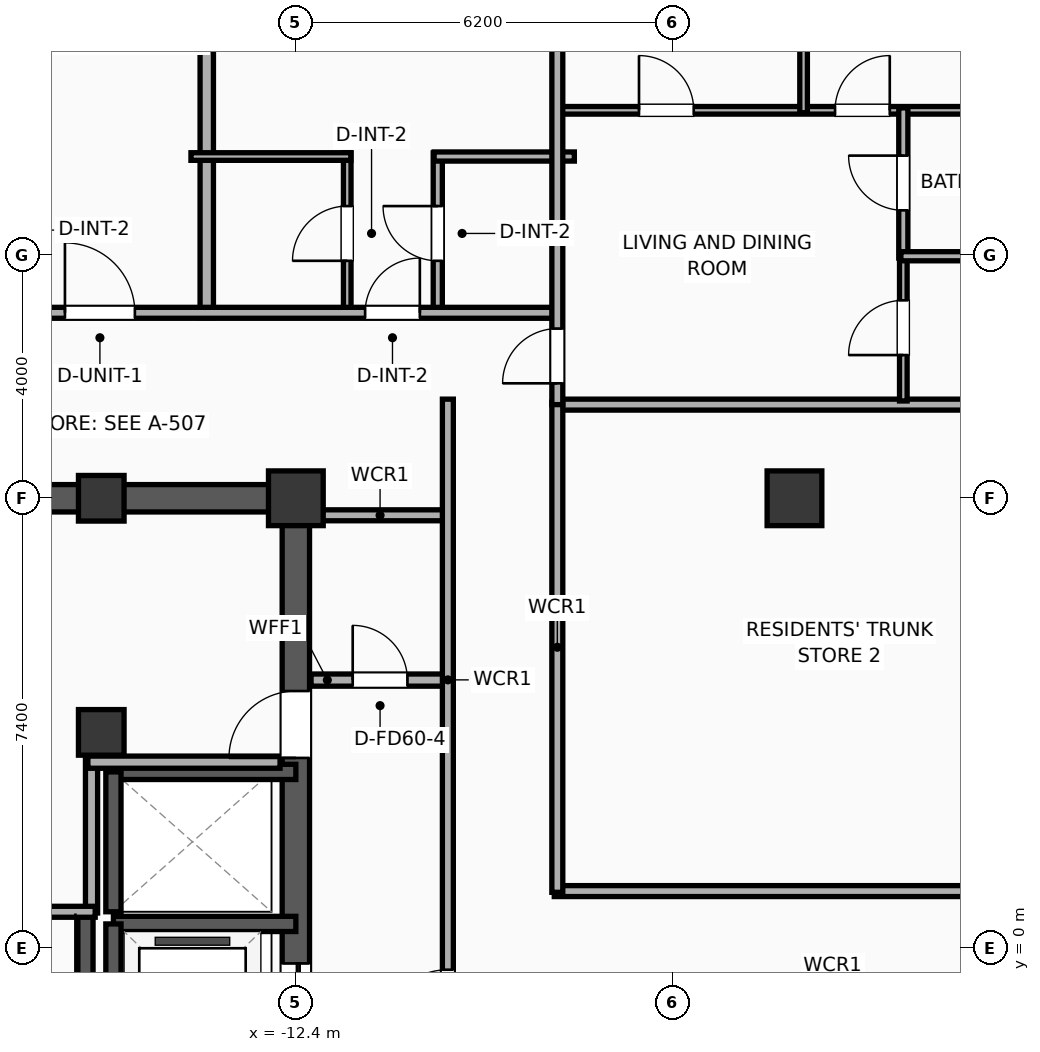
"""IFC4 building model, lengths in metres.
Left out: names, types, materials, properties, quantities, classifications, styles, units other than length and angle.
Written with IfcOpenShell. Run it as: python <this file> out.ifc"""

import sys

from ifc_helpers import new_model, si_unit, direction, frame, frame_2d, origin, origin_2d, place, context, subcontext, project, spatial, rectangle, extrude, element, fill, save


model = new_model("IFC4")
c1 = context("Model", 3, precision=1e-05, world=origin(), true_north=direction((0.0, 1.0)))
c2 = subcontext(c1, "Body", "Model", "MODEL_VIEW")
j1 = project(units=[si_unit("LENGTHUNIT", "METRE"), si_unit("PLANEANGLEUNIT", "RADIAN")], contexts=[c1])
p1 = place(None, origin())
s1 = spatial("IfcSite", under=j1, at=p1, CompositionType="ELEMENT")
p2 = place(p1, origin())
s2 = spatial("IfcBuilding", under=s1, at=p2, CompositionType="ELEMENT")
p3 = place(p2, frame((0.0, 0.0, 156.0)))
s3 = spatial("IfcBuildingStorey", under=s2, at=p3, CompositionType="ELEMENT", Elevation=156.0)
for number, where, z_axis, x_axis in (
    (1, (-15.6, 7.4, 0.0), (0.0, 0.0, 1.0), (1.0, 0.0, 0.0)),
    (2, (-15.6, 3.55, 0.0), (0.0, 0.0, 1.0), (1.0, 0.0, 0.0)),
):
    element("IfcColumn", number, at=place(p3, frame(where, z_axis=z_axis, x_axis=x_axis)), inside=s3, PredefinedType="COLUMN", context=c2, shape_type="SweptSolid", body=[
        extrude(rectangle(XDim=0.75, YDim=0.75, at=origin_2d()), origin(), (0.0, 0.0, 1.0), 3.9),
    ])
p4 = place(p3, frame((-12.4, 7.4, 0.0), z_axis=(0.0, 0.0, 1.0), x_axis=(1.0, 0.0, 0.0)))
e3 = element("IfcColumn", 3, at=p4, inside=s3, PredefinedType="COLUMN", context=c2, shape_type="SweptSolid", body=[
    extrude(rectangle(XDim=0.9, YDim=0.9, at=origin_2d()), origin(), (0.0, 0.0, 1.0), 3.9),
])
p5 = place(p3, frame((-19.425, 7.4, 0.0), z_axis=(0.0, 0.0, 1.0), x_axis=(1.0, 0.0, 0.0)))
e4 = element("IfcWall", 4, at=p5, inside=s3, PredefinedType="SHEAR", context=c2, shape_type="SweptSolid", body=[
    extrude(rectangle(XDim=7.25, YDim=0.45, at=frame_2d((3.625, 0.0))), origin(), (0.0, 0.0, 1.0), 3.65),
])
p6 = place(p3, frame((-12.4, -7.4, 0.0), z_axis=(0.0, 0.0, 1.0), x_axis=(0.0, 1.0, 0.0)))
e5 = element("IfcWall", 5, at=p6, inside=s3, PredefinedType="SHEAR", context=c2, shape_type="SweptSolid", body=[
    extrude(rectangle(XDim=14.8, YDim=0.45, at=frame_2d((7.4, 0.0))), origin(), (0.0, 0.0, 1.0), 3.65),
])
p7 = place(p6, frame((6.05, 0.0, 0.0)))
e6 = element("IfcOpeningElement", 6, at=p7, cuts=e5, PredefinedType="OPENING", context=c2, shape_type="SweptSolid", body=[
    extrude(rectangle(XDim=1.1, YDim=2.05, at=frame_2d((0.55, 1.025))), frame((0.0, 0.235, 0.0), z_axis=(0.0, -1.0, 0.0), x_axis=(1.0, 0.0, 0.0)), (0.0, 0.0, 1.0), 0.47),
])
p8 = place(p6, frame((10.53, 0.0, 0.0)))
e7 = element("IfcOpeningElement", 7, at=p8, cuts=e5, PredefinedType="OPENING", context=c2, shape_type="SweptSolid", body=[
    extrude(rectangle(XDim=1.1, YDim=2.05, at=frame_2d((0.55, 1.025))), frame((0.0, 0.235, 0.0), z_axis=(0.0, -1.0, 0.0), x_axis=(1.0, 0.0, 0.0)), (0.0, 0.0, 1.0), 0.47),
])
p9 = place(p6, frame((2.25, 0.0, 0.0)))
e8 = element("IfcOpeningElement", 8, at=p9, cuts=e5, PredefinedType="OPENING", context=c2, shape_type="SweptSolid", body=[
    extrude(rectangle(XDim=0.9, YDim=2.05, at=frame_2d((0.45, 1.025))), frame((0.0, 0.235, 0.0), z_axis=(0.0, -1.0, 0.0), x_axis=(1.0, 0.0, 0.0)), (0.0, 0.0, 1.0), 0.47),
])
p10 = place(p3, frame((-15.86, -7.085, 0.0), z_axis=(0.0, 0.0, 1.0), x_axis=(0.0, 1.0, 0.0)))
e9 = element("IfcWall", 9, at=p10, inside=s3, PredefinedType="SOLIDWALL", context=c2, shape_type="SweptSolid", body=[
    extrude(rectangle(XDim=7.685, YDim=0.25, at=frame_2d((3.843, 0.0))), origin(), (0.0, 0.0, 1.0), 3.65),
])
p11 = place(p3, frame((-4.2, 7.4, 0.0), z_axis=(0.0, 0.0, 1.0), x_axis=(1.0, 0.0, 0.0)))
e10 = element("IfcColumn", 10, at=p11, inside=s3, PredefinedType="COLUMN", context=c2, shape_type="SweptSolid", body=[
    extrude(rectangle(XDim=0.9, YDim=0.9, at=origin_2d()), origin(), (0.0, 0.0, 1.0), 3.9),
])
p12 = place(p3, frame((-12.4, 0.4, 0.0), z_axis=(0.0, 0.0, 1.0), x_axis=(-1.0, 0.0, 0.0)))
e11 = element("IfcWall", 11, at=p12, inside=s3, PredefinedType="SOLIDWALL", context=c2, shape_type="SweptSolid", body=[
    extrude(rectangle(XDim=3.0, YDim=0.25, at=frame_2d((1.5, 0.0))), origin(), (0.0, 0.0, 1.0), 3.65),
])
p13 = place(p3, frame((-15.4, 0.4, 0.0), z_axis=(0.0, 0.0, 1.0), x_axis=(0.0, -1.0, 0.0)))
e12 = element("IfcWall", 12, at=p13, inside=s3, PredefinedType="SOLIDWALL", context=c2, shape_type="SweptSolid", body=[
    extrude(rectangle(XDim=2.4, YDim=0.25, at=frame_2d((1.2, 0.0))), origin(), (0.0, 0.0, 1.0), 3.65),
])
p14 = place(p3, frame((-12.4, 2.9, 0.0), z_axis=(0.0, 0.0, 1.0), x_axis=(-1.0, 0.0, 0.0)))
e13 = element("IfcWall", 13, at=p14, inside=s3, PredefinedType="SOLIDWALL", context=c2, shape_type="SweptSolid", body=[
    extrude(rectangle(XDim=3.0, YDim=0.25, at=frame_2d((1.5, 0.0))), origin(), (0.0, 0.0, 1.0), 3.65),
])
p15 = place(p3, frame((-15.4, 2.9, 0.0), z_axis=(0.0, 0.0, 1.0), x_axis=(0.0, -1.0, 0.0)))
e14 = element("IfcWall", 14, at=p15, inside=s3, PredefinedType="SOLIDWALL", context=c2, shape_type="SweptSolid", body=[
    extrude(rectangle(XDim=2.3, YDim=0.25, at=frame_2d((1.15, 0.0))), origin(), (0.0, 0.0, 1.0), 3.65),
])
p16 = place(p3, frame((-15.76, 0.58, 0.0), z_axis=(0.0, 0.0, 1.0), x_axis=(0.0, 1.0, 0.0)))
e15 = element("IfcWall", 15, at=p16, inside=s3, PredefinedType="PARTITIONING", context=c2, shape_type="SweptSolid", body=[
    extrude(rectangle(XDim=2.52, YDim=0.2, at=frame_2d((1.26, 0.0))), origin(), (0.0, 0.0, 1.0), 3.65),
])
p17 = place(p3, frame((-15.82, 3.06, 0.0), z_axis=(0.0, 0.0, 1.0), x_axis=(1.0, 0.0, 0.0)))
e16 = element("IfcWall", 16, at=p17, inside=s3, PredefinedType="PARTITIONING", context=c2, shape_type="SweptSolid", body=[
    extrude(rectangle(XDim=3.16, YDim=0.2, at=frame_2d((1.58, 0.0))), origin(), (0.0, 0.0, 1.0), 3.65),
])
p18 = place(p3, frame((-19.06, 0.6, 0.0), z_axis=(0.0, 0.0, 1.0), x_axis=(1.0, 0.0, 0.0)))
e17 = element("IfcWall", 17, at=p18, inside=s3, PredefinedType="PARTITIONING", context=c2, shape_type="SweptSolid", body=[
    extrude(rectangle(XDim=3.36, YDim=0.18, at=frame_2d((1.68, 0.0))), origin(), (0.0, 0.0, 1.0), 3.65),
])
p19 = place(p18, frame((1.155, 0.0, 0.0)))
e18 = element("IfcOpeningElement", 18, at=p19, cuts=e17, PredefinedType="OPENING", context=c2, shape_type="SweptSolid", body=[
    extrude(rectangle(XDim=1.05, YDim=2.05, at=frame_2d((0.525, 1.025))), frame((0.0, 0.1, 0.0), z_axis=(0.0, -1.0, 0.0), x_axis=(1.0, 0.0, 0.0)), (0.0, 0.0, 1.0), 0.2),
])
p20 = place(p3, frame((-12.15, 4.41, 0.0), z_axis=(0.0, 0.0, 1.0), x_axis=(1.0, 0.0, 0.0)))
e19 = element("IfcWall", 19, at=p20, inside=s3, PredefinedType="PARTITIONING", context=c2, shape_type="SweptSolid", body=[
    extrude(rectangle(XDim=2.27, YDim=0.2, at=frame_2d((1.135, 0.0))), origin(), (0.0, 0.0, 1.0), 3.65),
])
p21 = place(p20, frame((0.685, 0.0, 0.0)))
e20 = element("IfcOpeningElement", 20, at=p21, cuts=e19, PredefinedType="OPENING", context=c2, shape_type="SweptSolid", body=[
    extrude(rectangle(XDim=0.9, YDim=2.05, at=frame_2d((0.45, 1.025))), frame((0.0, 0.11, 0.0), z_axis=(0.0, -1.0, 0.0), x_axis=(1.0, 0.0, 0.0)), (0.0, 0.0, 1.0), 0.22),
])
p22 = place(p3, frame((-12.15, 7.12, 0.0), z_axis=(0.0, 0.0, 1.0), x_axis=(1.0, 0.0, 0.0)))
e21 = element("IfcWall", 21, at=p22, inside=s3, PredefinedType="PARTITIONING", context=c2, shape_type="SweptSolid", body=[
    extrude(rectangle(XDim=2.27, YDim=0.18, at=frame_2d((1.135, 0.0))), origin(), (0.0, 0.0, 1.0), 3.65),
])
p23 = place(p3, frame((-9.9, -9.03, 0.0), z_axis=(0.0, 0.0, 1.0), x_axis=(0.0, 1.0, 0.0)))
e22 = element("IfcWall", 22, at=p23, inside=s3, PredefinedType="PARTITIONING", context=c2, shape_type="SweptSolid", body=[
    extrude(rectangle(XDim=18.06, YDim=0.18, at=frame_2d((9.03, 0.0))), origin(), (0.0, 0.0, 1.0), 3.65),
])
p24 = place(p23, frame((7.577, 0.0, 0.0)))
e23 = element("IfcOpeningElement", 23, at=p24, cuts=e22, PredefinedType="OPENING", context=c2, shape_type="SweptSolid", body=[
    extrude(rectangle(XDim=1.1, YDim=2.05, at=frame_2d((0.55, 1.025))), frame((0.0, 0.1, 0.0), z_axis=(0.0, -1.0, 0.0), x_axis=(1.0, 0.0, 0.0)), (0.0, 0.0, 1.0), 0.2),
])
p25 = place(p3, frame((-8.15, 8.94, 0.0), z_axis=(0.0, 0.0, 1.0), x_axis=(1.0, 0.0, 0.0)))
e24 = element("IfcWall", 24, at=p25, inside=s3, PredefinedType="PARTITIONING", context=c2, shape_type="SweptSolid", body=[
    extrude(rectangle(XDim=16.3, YDim=0.18, at=frame_2d((8.15, 0.0))), origin(), (0.0, 0.0, 1.0), 3.65),
])
p26 = place(p3, frame((-8.15, 0.94, 0.0), z_axis=(0.0, 0.0, 1.0), x_axis=(1.0, 0.0, 0.0)))
e25 = element("IfcWall", 25, at=p26, inside=s3, PredefinedType="PARTITIONING", context=c2, shape_type="SweptSolid", body=[
    extrude(rectangle(XDim=16.3, YDim=0.18, at=frame_2d((8.15, 0.0))), origin(), (0.0, 0.0, 1.0), 3.65),
])
p27 = place(p26, frame((7.675, 0.0, 0.0)))
e26 = element("IfcOpeningElement", 26, at=p27, cuts=e25, PredefinedType="OPENING", context=c2, shape_type="SweptSolid", body=[
    extrude(rectangle(XDim=0.95, YDim=2.05, at=frame_2d((0.475, 1.025))), frame((0.0, 0.1, 0.0), z_axis=(0.0, -1.0, 0.0), x_axis=(1.0, 0.0, 0.0)), (0.0, 0.0, 1.0), 0.2),
])
p28 = place(p3, frame((-8.1, 0.92, 0.0), z_axis=(0.0, 0.0, 1.0), x_axis=(0.0, 1.0, 0.0)))
e27 = element("IfcWall", 27, at=p28, inside=s3, PredefinedType="PARTITIONING", context=c2, shape_type="SweptSolid", body=[
    extrude(rectangle(XDim=8.06, YDim=0.18, at=frame_2d((4.03, 0.0))), origin(), (0.0, 0.0, 1.0), 3.65),
])
p29 = place(p3, frame((-13.865, 10.37, 0.0), z_axis=(0.0, 0.0, 1.0), x_axis=(0.0, 1.0, 0.0)))
e28 = element("IfcWall", 28, at=p29, inside=s3, PredefinedType="PARTITIONING", context=c2, shape_type="SweptSolid", body=[
    extrude(rectangle(XDim=8.25, YDim=0.22, at=frame_2d((4.125, 0.0))), origin(), (0.0, 0.0, 1.0), 3.65),
])
p30 = place(p3, frame((-11.555, 10.43, 0.0), z_axis=(0.0, 0.0, 1.0), x_axis=(0.0, 1.0, 0.0)))
e29 = element("IfcWall", 29, at=p30, inside=s3, PredefinedType="PARTITIONING", context=c2, shape_type="SweptSolid", body=[
    extrude(rectangle(XDim=2.65, YDim=0.125, at=frame_2d((1.325, 0.0))), origin(), (0.0, 0.0, 1.0), 3.04),
])
p31 = place(p30, frame((0.875, 0.0, 0.0)))
e30 = element("IfcOpeningElement", 30, at=p31, cuts=e29, PredefinedType="OPENING", context=c2, shape_type="SweptSolid", body=[
    extrude(rectangle(XDim=0.9, YDim=2.05, at=frame_2d((0.45, 1.025))), frame((0.0, 0.073, 0.0), z_axis=(0.0, -1.0, 0.0), x_axis=(1.0, 0.0, 0.0)), (0.0, 0.0, 1.0), 0.145),
])
p32 = place(p3, frame((-10.066, 10.43, 0.0), z_axis=(0.0, 0.0, 1.0), x_axis=(0.0, 1.0, 0.0)))
e31 = element("IfcWall", 31, at=p32, inside=s3, PredefinedType="PLUMBINGWALL", context=c2, shape_type="SweptSolid", body=[
    extrude(rectangle(XDim=2.65, YDim=0.15, at=frame_2d((1.325, 0.0))), origin(), (0.0, 0.0, 1.0), 3.65),
])
p33 = place(p32, frame((0.875, 0.0, 0.0)))
e32 = element("IfcOpeningElement", 32, at=p33, cuts=e31, PredefinedType="OPENING", context=c2, shape_type="SweptSolid", body=[
    extrude(rectangle(XDim=0.9, YDim=2.05, at=frame_2d((0.45, 1.025))), frame((0.0, 0.085, 0.0), z_axis=(0.0, -1.0, 0.0), x_axis=(1.0, 0.0, 0.0)), (0.0, 0.0, 1.0), 0.17),
])
p34 = place(p3, frame((-14.125, 13.02, 0.0), z_axis=(0.0, 0.0, 1.0), x_axis=(1.0, 0.0, 0.0)))
e33 = element("IfcWall", 33, at=p34, inside=s3, PredefinedType="PARTITIONING", context=c2, shape_type="SweptSolid", body=[
    extrude(rectangle(XDim=2.63, YDim=0.125, at=frame_2d((1.315, 0.0))), origin(), (0.0, 0.0, 1.0), 3.65),
])
p35 = place(p3, frame((-10.126, 13.02, 0.0), z_axis=(0.0, 0.0, 1.0), x_axis=(1.0, 0.0, 0.0)))
e34 = element("IfcWall", 34, at=p35, inside=s3, PredefinedType="PLUMBINGWALL", context=c2, shape_type="SweptSolid", body=[
    extrude(rectangle(XDim=2.306, YDim=0.15, at=frame_2d((1.153, 0.0))), origin(), (0.0, 0.0, 1.0), 3.65),
])
p36 = place(p3, frame((-19.75, 10.45, 0.0), z_axis=(0.0, 0.0, 1.0), x_axis=(1.0, 0.0, 0.0)))
e35 = element("IfcWall", 35, at=p36, inside=s3, PredefinedType="PARTITIONING", context=c2, shape_type="SweptSolid", body=[
    extrude(rectangle(XDim=11.67, YDim=0.18, at=frame_2d((5.835, 0.0))), origin(), (0.0, 0.0, 1.0), 3.65),
])
p37 = place(p36, frame((3.553, 0.0, 0.0)))
e36 = element("IfcOpeningElement", 36, at=p37, cuts=e35, PredefinedType="OPENING", context=c2, shape_type="SweptSolid", body=[
    extrude(rectangle(XDim=1.15, YDim=2.05, at=frame_2d((0.575, 1.025))), frame((0.0, 0.1, 0.0), z_axis=(0.0, -1.0, 0.0), x_axis=(1.0, 0.0, 0.0)), (0.0, 0.0, 1.0), 0.2),
])
p38 = place(p36, frame((8.489, 0.0, 0.0)))
e37 = element("IfcOpeningElement", 37, at=p38, cuts=e35, PredefinedType="OPENING", context=c2, shape_type="SweptSolid", body=[
    extrude(rectangle(XDim=0.9, YDim=2.05, at=frame_2d((0.45, 1.025))), frame((0.0, 0.1, 0.0), z_axis=(0.0, -1.0, 0.0), x_axis=(1.0, 0.0, 0.0)), (0.0, 0.0, 1.0), 0.2),
])
p39 = place(p3, frame((-8.08, 13.78, 0.0), z_axis=(0.0, 0.0, 1.0), x_axis=(1.0, 0.0, 0.0)))
e38 = element("IfcWall", 38, at=p39, inside=s3, PredefinedType="PARTITIONING", context=c2, shape_type="SweptSolid", body=[
    extrude(rectangle(XDim=8.06, YDim=0.125, at=frame_2d((4.03, 0.0))), origin(), (0.0, 0.0, 1.0), 3.65),
])
p40 = place(p39, frame((1.323, 0.0, 0.0)))
e39 = element("IfcOpeningElement", 39, at=p40, cuts=e38, PredefinedType="OPENING", context=c2, shape_type="SweptSolid", body=[
    extrude(rectangle(XDim=0.9, YDim=2.05, at=frame_2d((0.45, 1.025))), frame((0.0, 0.073, 0.0), z_axis=(0.0, -1.0, 0.0), x_axis=(1.0, 0.0, 0.0)), (0.0, 0.0, 1.0), 0.145),
])
p41 = place(p39, frame((4.547, 0.0, 0.0)))
e40 = element("IfcOpeningElement", 40, at=p41, cuts=e38, PredefinedType="OPENING", context=c2, shape_type="SweptSolid", body=[
    extrude(rectangle(XDim=0.9, YDim=2.05, at=frame_2d((0.45, 1.025))), frame((0.0, 0.073, 0.0), z_axis=(0.0, -1.0, 0.0), x_axis=(1.0, 0.0, 0.0)), (0.0, 0.0, 1.0), 0.145),
])
p42 = place(p3, frame((-2.41, 9.0, 0.0), z_axis=(0.0, 0.0, 1.0), x_axis=(0.0, 1.0, 0.0)))
e41 = element("IfcWall", 41, at=p42, inside=s3, PredefinedType="PARTITIONING", context=c2, shape_type="SweptSolid", body=[
    extrude(rectangle(XDim=2.41, YDim=0.125, at=frame_2d((1.205, 0.0))), origin(), (0.0, 0.0, 1.0), 3.65),
])
p43 = place(p42, frame((0.755, 0.0, 0.0)))
e42 = element("IfcOpeningElement", 42, at=p43, cuts=e41, PredefinedType="OPENING", context=c2, shape_type="SweptSolid", body=[
    extrude(rectangle(XDim=0.9, YDim=2.05, at=frame_2d((0.45, 1.025))), frame((0.0, 0.073, 0.0), z_axis=(0.0, -1.0, 0.0), x_axis=(1.0, 0.0, 0.0)), (0.0, 0.0, 1.0), 0.145),
])
p44 = place(p3, frame((-2.41, 11.35, 0.0), z_axis=(0.0, 0.0, 1.0), x_axis=(0.0, 1.0, 0.0)))
e43 = element("IfcWall", 43, at=p44, inside=s3, PredefinedType="PLUMBINGWALL", context=c2, shape_type="SweptSolid", body=[
    extrude(rectangle(XDim=2.47, YDim=0.15, at=frame_2d((1.235, 0.0))), origin(), (0.0, 0.0, 1.0), 3.04),
])
p45 = place(p44, frame((0.785, 0.0, 0.0)))
e44 = element("IfcOpeningElement", 44, at=p45, cuts=e43, PredefinedType="OPENING", context=c2, shape_type="SweptSolid", body=[
    extrude(rectangle(XDim=0.9, YDim=2.05, at=frame_2d((0.45, 1.025))), frame((0.0, 0.085, 0.0), z_axis=(0.0, -1.0, 0.0), x_axis=(1.0, 0.0, 0.0)), (0.0, 0.0, 1.0), 0.17),
])
p46 = place(p3, frame((-2.45, 11.38, 0.0), z_axis=(0.0, 0.0, 1.0), x_axis=(1.0, 0.0, 0.0)))
e45 = element("IfcWall", 45, at=p46, inside=s3, PredefinedType="PLUMBINGWALL", context=c2, shape_type="SweptSolid", body=[
    extrude(rectangle(XDim=2.43, YDim=0.15, at=frame_2d((1.215, 0.0))), origin(), (0.0, 0.0, 1.0), 3.65),
])
p47 = place(p3, frame((-4.05, 13.74, 0.0), z_axis=(0.0, 0.0, 1.0), x_axis=(0.0, 1.0, 0.0)))
e46 = element("IfcWall", 46, at=p47, inside=s3, PredefinedType="PARTITIONING", context=c2, shape_type="SweptSolid", body=[
    extrude(rectangle(XDim=5.912, YDim=0.125, at=frame_2d((2.956, 0.0))), origin(), (0.0, 0.0, 1.0), 3.65),
])
p48 = place(p3, frame((-8.1, 8.94, 0.0), z_axis=(0.0, 0.0, 1.0), x_axis=(0.0, 1.0, 0.0)))
e47 = element("IfcWall", 47, at=p48, inside=s3, PredefinedType="PARTITIONING", context=c2, shape_type="SweptSolid", body=[
    extrude(rectangle(XDim=10.286, YDim=0.18, at=frame_2d((5.143, 0.0))), origin(), (0.0, 0.0, 1.0), 3.65),
])
p49 = place(p48, frame((0.35, 0.0, 0.0)))
e48 = element("IfcOpeningElement", 48, at=p49, cuts=e47, PredefinedType="OPENING", context=c2, shape_type="SweptSolid", body=[
    extrude(rectangle(XDim=0.9, YDim=2.05, at=frame_2d((0.45, 1.025))), frame((0.0, 0.1, 0.0), z_axis=(0.0, -1.0, 0.0), x_axis=(1.0, 0.0, 0.0)), (0.0, 0.0, 1.0), 0.2),
])
p50 = place(p7, origin())
e49 = element("IfcDoor", 49, at=p50, inside=s3, OperationType="SLIDING_TO_LEFT", PredefinedType="DOOR", context=c2, shape_type="SweptSolid", body=[
    extrude(rectangle(XDim=1.1, YDim=2.05, at=frame_2d((0.55, 1.025))), frame((0.0, 0.025, 0.0), z_axis=(0.0, -1.0, 0.0), x_axis=(1.0, 0.0, 0.0)), (0.0, 0.0, 1.0), 0.05),
])
fill(e6, e49)
p51 = place(p21, origin())
e50 = element("IfcDoor", 50, at=p51, inside=s3, OperationType="SINGLE_SWING_LEFT", PredefinedType="DOOR", context=c2, shape_type="SweptSolid", body=[
    extrude(rectangle(XDim=0.9, YDim=2.05, at=frame_2d((0.45, 1.025))), frame((0.0, 0.025, 0.0), z_axis=(0.0, -1.0, 0.0), x_axis=(1.0, 0.0, 0.0)), (0.0, 0.0, 1.0), 0.05),
])
fill(e20, e50)
p52 = place(p24, origin())
e51 = element("IfcDoor", 51, at=p52, inside=s3, OperationType="SINGLE_SWING_LEFT", PredefinedType="DOOR", context=c2, shape_type="SweptSolid", body=[
    extrude(rectangle(XDim=1.1, YDim=2.05, at=frame_2d((0.55, 1.025))), frame((0.0, 0.025, 0.0), z_axis=(0.0, -1.0, 0.0), x_axis=(1.0, 0.0, 0.0)), (0.0, 0.0, 1.0), 0.05),
])
fill(e23, e51)
p53 = place(p31, origin())
e52 = element("IfcDoor", 52, at=p53, inside=s3, OperationType="SINGLE_SWING_LEFT", PredefinedType="DOOR", context=c2, shape_type="SweptSolid", body=[
    extrude(rectangle(XDim=0.9, YDim=2.05, at=frame_2d((0.45, 1.025))), frame((0.0, 0.025, 0.0), z_axis=(0.0, -1.0, 0.0), x_axis=(1.0, 0.0, 0.0)), (0.0, 0.0, 1.0), 0.05),
])
fill(e30, e52)
p54 = place(p33, origin())
e53 = element("IfcDoor", 53, at=p54, inside=s3, OperationType="SINGLE_SWING_RIGHT", PredefinedType="DOOR", context=c2, shape_type="SweptSolid", body=[
    extrude(rectangle(XDim=0.9, YDim=2.05, at=frame_2d((0.45, 1.025))), frame((0.0, 0.025, 0.0), z_axis=(0.0, -1.0, 0.0), x_axis=(1.0, 0.0, 0.0)), (0.0, 0.0, 1.0), 0.05),
])
fill(e32, e53)
p55 = place(p37, origin())
e54 = element("IfcDoor", 54, at=p55, inside=s3, OperationType="SINGLE_SWING_LEFT", PredefinedType="DOOR", context=c2, shape_type="SweptSolid", body=[
    extrude(rectangle(XDim=1.15, YDim=2.05, at=frame_2d((0.575, 1.025))), frame((0.0, 0.025, 0.0), z_axis=(0.0, -1.0, 0.0), x_axis=(1.0, 0.0, 0.0)), (0.0, 0.0, 1.0), 0.05),
])
fill(e36, e54)
p56 = place(p38, origin())
e55 = element("IfcDoor", 55, at=p56, inside=s3, OperationType="SINGLE_SWING_RIGHT", PredefinedType="DOOR", context=c2, shape_type="SweptSolid", body=[
    extrude(rectangle(XDim=0.9, YDim=2.05, at=frame_2d((0.45, 1.025))), frame((0.0, 0.025, 0.0), z_axis=(0.0, -1.0, 0.0), x_axis=(1.0, 0.0, 0.0)), (0.0, 0.0, 1.0), 0.05),
])
fill(e37, e55)
p57 = place(p40, origin())
e56 = element("IfcDoor", 56, at=p57, inside=s3, OperationType="SINGLE_SWING_LEFT", PredefinedType="DOOR", context=c2, shape_type="SweptSolid", body=[
    extrude(rectangle(XDim=0.9, YDim=2.05, at=frame_2d((0.45, 1.025))), frame((0.0, 0.025, 0.0), z_axis=(0.0, -1.0, 0.0), x_axis=(1.0, 0.0, 0.0)), (0.0, 0.0, 1.0), 0.05),
])
fill(e39, e56)
p58 = place(p41, origin())
e57 = element("IfcDoor", 57, at=p58, inside=s3, OperationType="SINGLE_SWING_RIGHT", PredefinedType="DOOR", context=c2, shape_type="SweptSolid", body=[
    extrude(rectangle(XDim=0.9, YDim=2.05, at=frame_2d((0.45, 1.025))), frame((0.0, 0.025, 0.0), z_axis=(0.0, -1.0, 0.0), x_axis=(1.0, 0.0, 0.0)), (0.0, 0.0, 1.0), 0.05),
])
fill(e40, e57)
p59 = place(p43, origin())
e58 = element("IfcDoor", 58, at=p59, inside=s3, OperationType="SINGLE_SWING_LEFT", PredefinedType="DOOR", context=c2, shape_type="SweptSolid", body=[
    extrude(rectangle(XDim=0.9, YDim=2.05, at=frame_2d((0.45, 1.025))), frame((0.0, 0.025, 0.0), z_axis=(0.0, -1.0, 0.0), x_axis=(1.0, 0.0, 0.0)), (0.0, 0.0, 1.0), 0.05),
])
fill(e42, e58)
p60 = place(p45, origin())
e59 = element("IfcDoor", 59, at=p60, inside=s3, OperationType="SINGLE_SWING_RIGHT", PredefinedType="DOOR", context=c2, shape_type="SweptSolid", body=[
    extrude(rectangle(XDim=0.9, YDim=2.05, at=frame_2d((0.45, 1.025))), frame((0.0, 0.025, 0.0), z_axis=(0.0, -1.0, 0.0), x_axis=(1.0, 0.0, 0.0)), (0.0, 0.0, 1.0), 0.05),
])
fill(e44, e59)
p61 = place(p49, origin())
e60 = element("IfcDoor", 60, at=p61, inside=s3, OperationType="SINGLE_SWING_LEFT", PredefinedType="DOOR", context=c2, shape_type="SweptSolid", body=[
    extrude(rectangle(XDim=0.9, YDim=2.05, at=frame_2d((0.45, 1.025))), frame((0.0, 0.025, 0.0), z_axis=(0.0, -1.0, 0.0), x_axis=(1.0, 0.0, 0.0)), (0.0, 0.0, 1.0), 0.05),
])
fill(e48, e60)
p62 = place(p8, origin())
e61 = element("IfcDoor", 61, at=p62, inside=s3, OperationType="SINGLE_SWING_LEFT", PredefinedType="DOOR", context=c2, shape_type="SweptSolid", body=[
    extrude(rectangle(XDim=1.1, YDim=2.05, at=frame_2d((0.55, 1.025))), frame((0.0, 0.025, 0.0), z_axis=(0.0, -1.0, 0.0), x_axis=(1.0, 0.0, 0.0)), (0.0, 0.0, 1.0), 0.05),
])
fill(e7, e61)
save(model, sys.argv[1])
